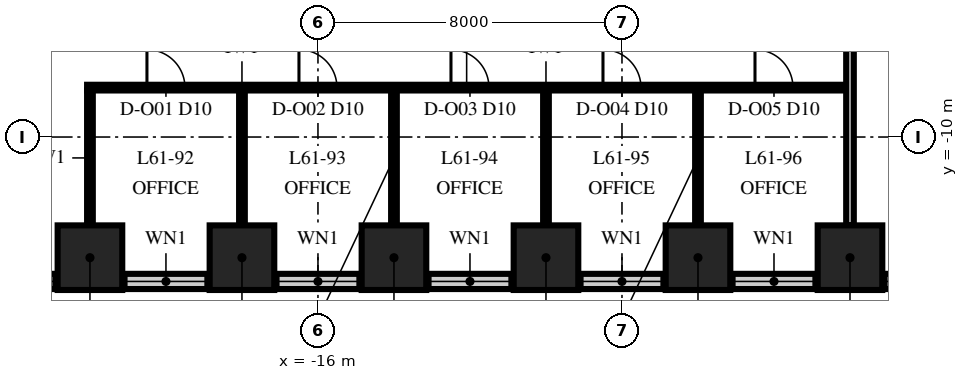
"""IFC4 building model, lengths in metres.
Left out: names, types, materials, properties, quantities, classifications, styles, units other than length and angle.
Written with IfcOpenShell. Run it as: python <this file> out.ifc"""

import sys

from ifc_helpers import new_model, si_unit, direction, frame, frame_2d, origin, origin_2d, place, context, subcontext, project, spatial, rectangle, extrude, element, fill, save


model = new_model("IFC4")
c1 = context("Model", 3, precision=1e-05, world=origin(), true_north=direction((0.0, 1.0)))
c2 = subcontext(c1, "Body", "Model", "MODEL_VIEW")
j1 = project(units=[si_unit("LENGTHUNIT", "METRE"), si_unit("PLANEANGLEUNIT", "RADIAN")], contexts=[c1])
p1 = place(None, origin())
s1 = spatial("IfcSite", under=j1, at=p1, CompositionType="ELEMENT")
p2 = place(p1, origin())
s2 = spatial("IfcBuilding", under=s1, at=p2, CompositionType="ELEMENT")
p3 = place(p2, frame((0.0, 0.0, 264.0)))
s3 = spatial("IfcBuildingStorey", under=s2, at=p3, CompositionType="ELEMENT", Elevation=264.0)
for number, where, z_axis, x_axis in (
    (1, (-22.0, -13.175, 0.0), (0.0, 0.0, 1.0), (1.0, 0.0, 0.0)),
    (2, (-18.0, -13.175, 0.0), (0.0, 0.0, 1.0), (1.0, 0.0, 0.0)),
    (3, (-14.0, -13.175, 0.0), (0.0, 0.0, 1.0), (1.0, 0.0, 0.0)),
    (4, (-10.0, -13.175, 0.0), (0.0, 0.0, 1.0), (1.0, 0.0, 0.0)),
    (5, (-6.0, -13.175, 0.0), (0.0, 0.0, 1.0), (1.0, 0.0, 0.0)),
    (6, (-2.0, -13.175, 0.0), (0.0, 0.0, 1.0), (1.0, 0.0, 0.0)),
):
    element("IfcColumn", number, at=place(p3, frame(where, z_axis=z_axis, x_axis=x_axis)), inside=s3, PredefinedType="COLUMN", context=c2, shape_type="SweptSolid", body=[
        extrude(rectangle(XDim=1.7, YDim=1.7, at=origin_2d()), origin(), (0.0, 0.0, 1.0), 4.0),
    ])
p4 = place(p3, frame((-26.0, -13.8, 0.0), z_axis=(0.0, 0.0, 1.0), x_axis=(1.0, 0.0, 0.0)))
e7 = element("IfcWall", 7, at=p4, inside=s3, PredefinedType="SOLIDWALL", context=c2, shape_type="SweptSolid", body=[
    extrude(rectangle(XDim=52.0, YDim=0.4, at=frame_2d((26.0, 0.0))), origin(), (0.0, 0.0, 1.0), 2.0),
])
p5 = place(p4, frame((0.95, 0.0, 0.8)))
e8 = element("IfcOpeningElement", 8, at=p5, cuts=e7, PredefinedType="OPENING", context=c2, shape_type="SweptSolid", body=[
    extrude(rectangle(XDim=2.1, YDim=1.15, at=frame_2d((1.05, 0.575))), frame((0.0, 0.215, 0.0), z_axis=(0.0, -1.0, 0.0), x_axis=(1.0, 0.0, 0.0)), (0.0, 0.0, 1.0), 0.43),
])
p6 = place(p4, frame((4.95, 0.0, 0.8)))
e9 = element("IfcOpeningElement", 9, at=p6, cuts=e7, PredefinedType="OPENING", context=c2, shape_type="SweptSolid", body=[
    extrude(rectangle(XDim=2.1, YDim=1.15, at=frame_2d((1.05, 0.575))), frame((0.0, 0.215, 0.0), z_axis=(0.0, -1.0, 0.0), x_axis=(1.0, 0.0, 0.0)), (0.0, 0.0, 1.0), 0.43),
])
p7 = place(p4, frame((8.95, 0.0, 0.8)))
e10 = element("IfcOpeningElement", 10, at=p7, cuts=e7, PredefinedType="OPENING", context=c2, shape_type="SweptSolid", body=[
    extrude(rectangle(XDim=2.1, YDim=1.15, at=frame_2d((1.05, 0.575))), frame((0.0, 0.215, 0.0), z_axis=(0.0, -1.0, 0.0), x_axis=(1.0, 0.0, 0.0)), (0.0, 0.0, 1.0), 0.43),
])
p8 = place(p4, frame((12.95, 0.0, 0.8)))
e11 = element("IfcOpeningElement", 11, at=p8, cuts=e7, PredefinedType="OPENING", context=c2, shape_type="SweptSolid", body=[
    extrude(rectangle(XDim=2.1, YDim=1.15, at=frame_2d((1.05, 0.575))), frame((0.0, 0.215, 0.0), z_axis=(0.0, -1.0, 0.0), x_axis=(1.0, 0.0, 0.0)), (0.0, 0.0, 1.0), 0.43),
])
p9 = place(p4, frame((16.95, 0.0, 0.8)))
e12 = element("IfcOpeningElement", 12, at=p9, cuts=e7, PredefinedType="OPENING", context=c2, shape_type="SweptSolid", body=[
    extrude(rectangle(XDim=2.1, YDim=1.15, at=frame_2d((1.05, 0.575))), frame((0.0, 0.215, 0.0), z_axis=(0.0, -1.0, 0.0), x_axis=(1.0, 0.0, 0.0)), (0.0, 0.0, 1.0), 0.43),
])
p10 = place(p4, frame((20.95, 0.0, 0.8)))
e13 = element("IfcOpeningElement", 13, at=p10, cuts=e7, PredefinedType="OPENING", context=c2, shape_type="SweptSolid", body=[
    extrude(rectangle(XDim=2.1, YDim=1.15, at=frame_2d((1.05, 0.575))), frame((0.0, 0.215, 0.0), z_axis=(0.0, -1.0, 0.0), x_axis=(1.0, 0.0, 0.0)), (0.0, 0.0, 1.0), 0.43),
])
p11 = place(p4, frame((24.95, 0.0, 0.8)))
e14 = element("IfcOpeningElement", 14, at=p11, cuts=e7, PredefinedType="OPENING", context=c2, shape_type="SweptSolid", body=[
    extrude(rectangle(XDim=2.1, YDim=1.15, at=frame_2d((1.05, 0.575))), frame((0.0, 0.215, 0.0), z_axis=(0.0, -1.0, 0.0), x_axis=(1.0, 0.0, 0.0)), (0.0, 0.0, 1.0), 0.43),
])
p12 = place(p4, frame((28.95, 0.0, 0.8)))
e15 = element("IfcOpeningElement", 15, at=p12, cuts=e7, PredefinedType="OPENING", context=c2, shape_type="SweptSolid", body=[
    extrude(rectangle(XDim=2.1, YDim=1.15, at=frame_2d((1.05, 0.575))), frame((0.0, 0.215, 0.0), z_axis=(0.0, -1.0, 0.0), x_axis=(1.0, 0.0, 0.0)), (0.0, 0.0, 1.0), 0.43),
])
p13 = place(p4, frame((32.95, 0.0, 0.8)))
e16 = element("IfcOpeningElement", 16, at=p13, cuts=e7, PredefinedType="OPENING", context=c2, shape_type="SweptSolid", body=[
    extrude(rectangle(XDim=2.1, YDim=1.15, at=frame_2d((1.05, 0.575))), frame((0.0, 0.215, 0.0), z_axis=(0.0, -1.0, 0.0), x_axis=(1.0, 0.0, 0.0)), (0.0, 0.0, 1.0), 0.43),
])
p14 = place(p4, frame((36.95, 0.0, 0.8)))
e17 = element("IfcOpeningElement", 17, at=p14, cuts=e7, PredefinedType="OPENING", context=c2, shape_type="SweptSolid", body=[
    extrude(rectangle(XDim=2.1, YDim=1.15, at=frame_2d((1.05, 0.575))), frame((0.0, 0.215, 0.0), z_axis=(0.0, -1.0, 0.0), x_axis=(1.0, 0.0, 0.0)), (0.0, 0.0, 1.0), 0.43),
])
p15 = place(p4, frame((40.95, 0.0, 0.8)))
e18 = element("IfcOpeningElement", 18, at=p15, cuts=e7, PredefinedType="OPENING", context=c2, shape_type="SweptSolid", body=[
    extrude(rectangle(XDim=2.1, YDim=1.15, at=frame_2d((1.05, 0.575))), frame((0.0, 0.215, 0.0), z_axis=(0.0, -1.0, 0.0), x_axis=(1.0, 0.0, 0.0)), (0.0, 0.0, 1.0), 0.43),
])
p16 = place(p4, frame((44.95, 0.0, 0.8)))
e19 = element("IfcOpeningElement", 19, at=p16, cuts=e7, PredefinedType="OPENING", context=c2, shape_type="SweptSolid", body=[
    extrude(rectangle(XDim=2.1, YDim=1.15, at=frame_2d((1.05, 0.575))), frame((0.0, 0.215, 0.0), z_axis=(0.0, -1.0, 0.0), x_axis=(1.0, 0.0, 0.0)), (0.0, 0.0, 1.0), 0.43),
])
p17 = place(p4, frame((48.95, 0.0, 0.8)))
e20 = element("IfcOpeningElement", 20, at=p17, cuts=e7, PredefinedType="OPENING", context=c2, shape_type="SweptSolid", body=[
    extrude(rectangle(XDim=2.1, YDim=1.15, at=frame_2d((1.05, 0.575))), frame((0.0, 0.215, 0.0), z_axis=(0.0, -1.0, 0.0), x_axis=(1.0, 0.0, 0.0)), (0.0, 0.0, 1.0), 0.43),
])
p18 = place(p3, frame((-22.075, -8.7, 0.0), z_axis=(0.0, 0.0, 1.0), x_axis=(1.0, 0.0, 0.0)))
e21 = element("IfcWall", 21, at=p18, inside=s3, PredefinedType="PARTITIONING", context=c2, shape_type="SweptSolid", body=[
    extrude(rectangle(XDim=19.975, YDim=0.15, at=frame_2d((9.987, 0.0))), origin(), (0.0, 0.0, 1.0), 3.23),
])
p19 = place(p18, frame((1.575, 0.0, 0.0)))
e22 = element("IfcOpeningElement", 22, at=p19, cuts=e21, PredefinedType="OPENING", context=c2, shape_type="SweptSolid", body=[
    extrude(rectangle(XDim=1.0, YDim=2.3, at=frame_2d((0.5, 1.15))), frame((0.0, 0.09, 0.0), z_axis=(0.0, -1.0, 0.0), x_axis=(1.0, 0.0, 0.0)), (0.0, 0.0, 1.0), 0.18),
])
p20 = place(p18, frame((5.575, 0.0, 0.0)))
e23 = element("IfcOpeningElement", 23, at=p20, cuts=e21, PredefinedType="OPENING", context=c2, shape_type="SweptSolid", body=[
    extrude(rectangle(XDim=1.0, YDim=2.3, at=frame_2d((0.5, 1.15))), frame((0.0, 0.09, 0.0), z_axis=(0.0, -1.0, 0.0), x_axis=(1.0, 0.0, 0.0)), (0.0, 0.0, 1.0), 0.18),
])
p21 = place(p18, frame((9.575, 0.0, 0.0)))
e24 = element("IfcOpeningElement", 24, at=p21, cuts=e21, PredefinedType="OPENING", context=c2, shape_type="SweptSolid", body=[
    extrude(rectangle(XDim=1.0, YDim=2.3, at=frame_2d((0.5, 1.15))), frame((0.0, 0.09, 0.0), z_axis=(0.0, -1.0, 0.0), x_axis=(1.0, 0.0, 0.0)), (0.0, 0.0, 1.0), 0.18),
])
p22 = place(p18, frame((13.575, 0.0, 0.0)))
e25 = element("IfcOpeningElement", 25, at=p22, cuts=e21, PredefinedType="OPENING", context=c2, shape_type="SweptSolid", body=[
    extrude(rectangle(XDim=1.0, YDim=2.3, at=frame_2d((0.5, 1.15))), frame((0.0, 0.09, 0.0), z_axis=(0.0, -1.0, 0.0), x_axis=(1.0, 0.0, 0.0)), (0.0, 0.0, 1.0), 0.18),
])
p23 = place(p18, frame((17.575, 0.0, 0.0)))
e26 = element("IfcOpeningElement", 26, at=p23, cuts=e21, PredefinedType="OPENING", context=c2, shape_type="SweptSolid", body=[
    extrude(rectangle(XDim=1.0, YDim=2.3, at=frame_2d((0.5, 1.15))), frame((0.0, 0.09, 0.0), z_axis=(0.0, -1.0, 0.0), x_axis=(1.0, 0.0, 0.0)), (0.0, 0.0, 1.0), 0.18),
])
for number, where, z_axis, x_axis in (
    (27, (-22.0, -12.325, 0.0), (0.0, 0.0, 1.0), (0.0, 1.0, 0.0)),
    (28, (-18.0, -12.325, 0.0), (0.0, 0.0, 1.0), (0.0, 1.0, 0.0)),
    (29, (-14.0, -12.325, 0.0), (0.0, 0.0, 1.0), (0.0, 1.0, 0.0)),
    (30, (-10.0, -12.325, 0.0), (0.0, 0.0, 1.0), (0.0, 1.0, 0.0)),
    (31, (-6.0, -12.325, 0.0), (0.0, 0.0, 1.0), (0.0, 1.0, 0.0)),
):
    element("IfcWall", number, at=place(p3, frame(where, z_axis=z_axis, x_axis=x_axis)), inside=s3, PredefinedType="PARTITIONING", context=c2, shape_type="SweptSolid", body=[
        extrude(rectangle(XDim=3.55, YDim=0.15, at=frame_2d((1.775, 0.0))), origin(), (0.0, 0.0, 1.0), 3.23),
    ])
p24 = place(p3, frame((-2.0, -12.325, 0.0), z_axis=(0.0, 0.0, 1.0), x_axis=(0.0, 1.0, 0.0)))
e32 = element("IfcWall", 32, at=p24, inside=s3, PredefinedType="PARTITIONING", context=c2, shape_type="SweptSolid", body=[
    extrude(rectangle(XDim=16.175, YDim=0.2, at=frame_2d((8.087, 0.0))), origin(), (0.0, 0.0, 1.0), 2.842),
])
p25 = place(p5, origin())
e33 = element("IfcWindow", 33, at=p25, inside=s3, PartitioningType="SINGLE_PANEL", PredefinedType="WINDOW", context=c2, shape_type="SweptSolid", body=[
    extrude(rectangle(XDim=2.1, YDim=1.15, at=frame_2d((1.05, 0.575))), frame((0.0, 0.03, 0.0), z_axis=(0.0, -1.0, 0.0), x_axis=(1.0, 0.0, 0.0)), (0.0, 0.0, 1.0), 0.06),
])
fill(e8, e33)
p26 = place(p6, origin())
e34 = element("IfcWindow", 34, at=p26, inside=s3, PartitioningType="SINGLE_PANEL", PredefinedType="WINDOW", context=c2, shape_type="SweptSolid", body=[
    extrude(rectangle(XDim=2.1, YDim=1.15, at=frame_2d((1.05, 0.575))), frame((0.0, 0.03, 0.0), z_axis=(0.0, -1.0, 0.0), x_axis=(1.0, 0.0, 0.0)), (0.0, 0.0, 1.0), 0.06),
])
fill(e9, e34)
p27 = place(p7, origin())
e35 = element("IfcWindow", 35, at=p27, inside=s3, PartitioningType="SINGLE_PANEL", PredefinedType="WINDOW", context=c2, shape_type="SweptSolid", body=[
    extrude(rectangle(XDim=2.1, YDim=1.15, at=frame_2d((1.05, 0.575))), frame((0.0, 0.03, 0.0), z_axis=(0.0, -1.0, 0.0), x_axis=(1.0, 0.0, 0.0)), (0.0, 0.0, 1.0), 0.06),
])
fill(e10, e35)
p28 = place(p8, origin())
e36 = element("IfcWindow", 36, at=p28, inside=s3, PartitioningType="SINGLE_PANEL", PredefinedType="WINDOW", context=c2, shape_type="SweptSolid", body=[
    extrude(rectangle(XDim=2.1, YDim=1.15, at=frame_2d((1.05, 0.575))), frame((0.0, 0.03, 0.0), z_axis=(0.0, -1.0, 0.0), x_axis=(1.0, 0.0, 0.0)), (0.0, 0.0, 1.0), 0.06),
])
fill(e11, e36)
p29 = place(p9, origin())
e37 = element("IfcWindow", 37, at=p29, inside=s3, PartitioningType="SINGLE_PANEL", PredefinedType="WINDOW", context=c2, shape_type="SweptSolid", body=[
    extrude(rectangle(XDim=2.1, YDim=1.15, at=frame_2d((1.05, 0.575))), frame((0.0, 0.03, 0.0), z_axis=(0.0, -1.0, 0.0), x_axis=(1.0, 0.0, 0.0)), (0.0, 0.0, 1.0), 0.06),
])
fill(e12, e37)
p30 = place(p10, origin())
e38 = element("IfcWindow", 38, at=p30, inside=s3, PartitioningType="SINGLE_PANEL", PredefinedType="WINDOW", context=c2, shape_type="SweptSolid", body=[
    extrude(rectangle(XDim=2.1, YDim=1.15, at=frame_2d((1.05, 0.575))), frame((0.0, 0.03, 0.0), z_axis=(0.0, -1.0, 0.0), x_axis=(1.0, 0.0, 0.0)), (0.0, 0.0, 1.0), 0.06),
])
fill(e13, e38)
p31 = place(p11, origin())
e39 = element("IfcWindow", 39, at=p31, inside=s3, PartitioningType="SINGLE_PANEL", PredefinedType="WINDOW", context=c2, shape_type="SweptSolid", body=[
    extrude(rectangle(XDim=2.1, YDim=1.15, at=frame_2d((1.05, 0.575))), frame((0.0, 0.03, 0.0), z_axis=(0.0, -1.0, 0.0), x_axis=(1.0, 0.0, 0.0)), (0.0, 0.0, 1.0), 0.06),
])
fill(e14, e39)
p32 = place(p19, origin())
e40 = element("IfcDoor", 40, at=p32, inside=s3, OperationType="SINGLE_SWING_LEFT", PredefinedType="DOOR", context=c2, shape_type="SweptSolid", body=[
    extrude(rectangle(XDim=1.0, YDim=2.3, at=frame_2d((0.5, 1.15))), frame((0.0, 0.075, 0.0), z_axis=(0.0, -1.0, 0.0), x_axis=(1.0, 0.0, 0.0)), (0.0, 0.0, 1.0), 0.149),
])
fill(e22, e40)
p33 = place(p20, origin())
e41 = element("IfcDoor", 41, at=p33, inside=s3, OperationType="SINGLE_SWING_LEFT", PredefinedType="DOOR", context=c2, shape_type="SweptSolid", body=[
    extrude(rectangle(XDim=1.0, YDim=2.3, at=frame_2d((0.5, 1.15))), frame((0.0, 0.075, 0.0), z_axis=(0.0, -1.0, 0.0), x_axis=(1.0, 0.0, 0.0)), (0.0, 0.0, 1.0), 0.149),
])
fill(e23, e41)
p34 = place(p21, origin())
e42 = element("IfcDoor", 42, at=p34, inside=s3, OperationType="SINGLE_SWING_LEFT", PredefinedType="DOOR", context=c2, shape_type="SweptSolid", body=[
    extrude(rectangle(XDim=1.0, YDim=2.3, at=frame_2d((0.5, 1.15))), frame((0.0, 0.075, 0.0), z_axis=(0.0, -1.0, 0.0), x_axis=(1.0, 0.0, 0.0)), (0.0, 0.0, 1.0), 0.149),
])
fill(e24, e42)
p35 = place(p22, origin())
e43 = element("IfcDoor", 43, at=p35, inside=s3, OperationType="SINGLE_SWING_LEFT", PredefinedType="DOOR", context=c2, shape_type="SweptSolid", body=[
    extrude(rectangle(XDim=1.0, YDim=2.3, at=frame_2d((0.5, 1.15))), frame((0.0, 0.075, 0.0), z_axis=(0.0, -1.0, 0.0), x_axis=(1.0, 0.0, 0.0)), (0.0, 0.0, 1.0), 0.149),
])
fill(e25, e43)
p36 = place(p23, origin())
e44 = element("IfcDoor", 44, at=p36, inside=s3, OperationType="SINGLE_SWING_LEFT", PredefinedType="DOOR", context=c2, shape_type="SweptSolid", body=[
    extrude(rectangle(XDim=1.0, YDim=2.3, at=frame_2d((0.5, 1.15))), frame((0.0, 0.075, 0.0), z_axis=(0.0, -1.0, 0.0), x_axis=(1.0, 0.0, 0.0)), (0.0, 0.0, 1.0), 0.149),
])
fill(e26, e44)
save(model, sys.argv[1])
